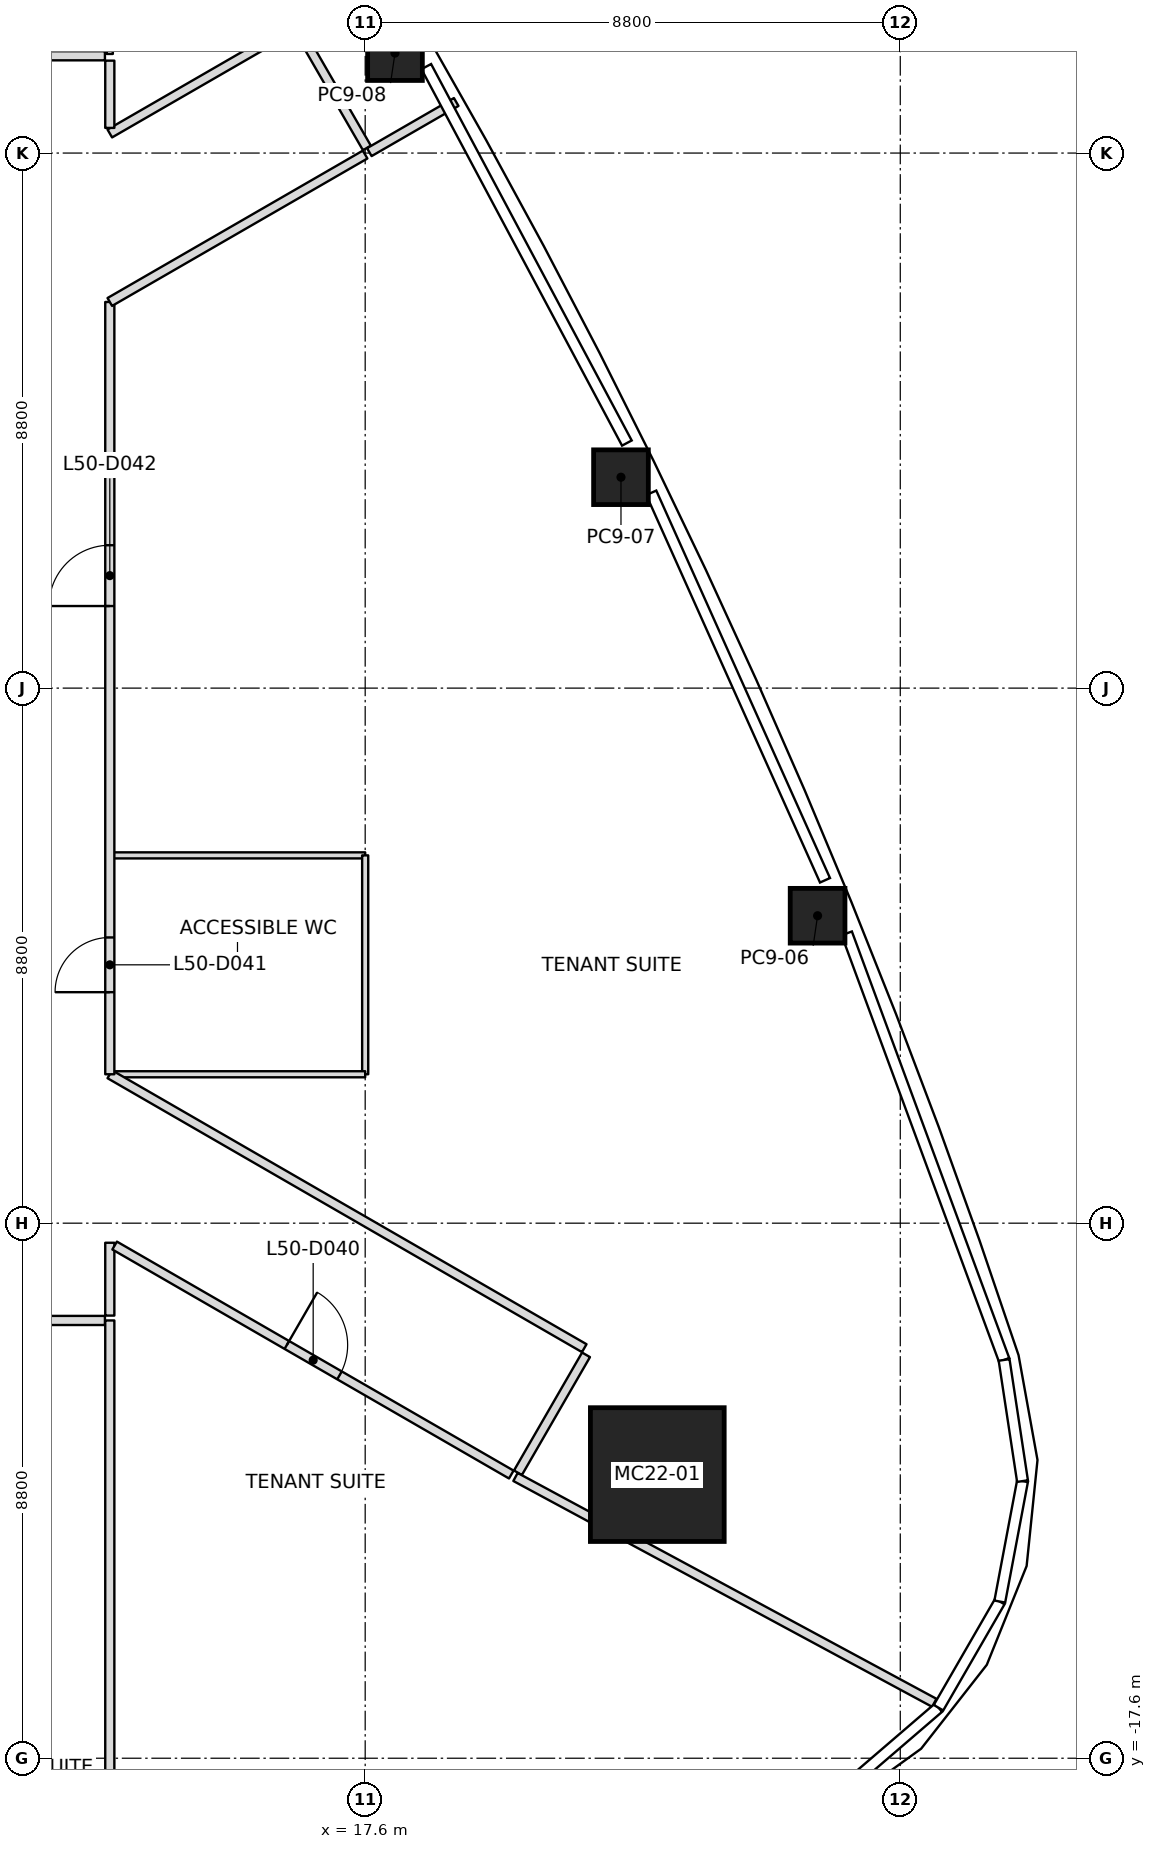
"""IFC4 building model, lengths in metres.
Left out: names, types, materials, properties, quantities, classifications, styles, units other than length and angle.
Written with IfcOpenShell. Run it as: python <this file> out.ifc"""

import sys

from ifc_helpers import new_model, si_unit, direction, frame, frame_2d, origin, origin_2d, place, context, subcontext, project, spatial, rectangle, extrude, clip, halfspace, element, fill, save


model = new_model("IFC4")
c1 = context("Model", 3, precision=1e-05, world=origin(), true_north=direction((0.0, 1.0)))
c2 = subcontext(c1, "Body", "Model", "MODEL_VIEW")
j1 = project(units=[si_unit("LENGTHUNIT", "METRE"), si_unit("PLANEANGLEUNIT", "RADIAN")], contexts=[c1])
p1 = place(None, origin())
s1 = spatial("IfcSite", under=j1, at=p1, CompositionType="ELEMENT")
p2 = place(p1, origin())
s2 = spatial("IfcBuilding", under=s1, at=p2, CompositionType="ELEMENT")
p3 = place(p2, frame((0.0, 0.0, 227.0)))
s3 = spatial("IfcBuildingStorey", under=s2, at=p3, CompositionType="ELEMENT", Elevation=227.0)
p4 = place(p3, frame((22.404, -12.935, 0.0), z_axis=(-0.027878605886, 0.016104927689, 0.999481572936), x_axis=(0.999611316129, 0.000449157512, 0.02787498742)))
e1 = element("IfcColumn", 1, at=p4, inside=s3, PredefinedType="COLUMN", context=c2, shape_type="SweptSolid", body=[
    clip(extrude(rectangle(XDim=2.2, YDim=2.2, at=origin_2d()), origin(), (0.0, 0.0, 1.0), 4.002), halfspace(frame((0.0, 0.0, 0.011)), True)),
])
p5 = place(p3, frame((25.04, -3.744, 0.0), z_axis=(-0.017757540332, 0.01000768596, 0.999792236409), x_axis=(-0.377729507005, 0.925778156217, -0.015975763193)))
e2 = element("IfcColumn", 2, at=p5, inside=s3, PredefinedType="COLUMN", context=c2, shape_type="SweptSolid", body=[
    clip(extrude(rectangle(XDim=0.9, YDim=0.9, at=origin_2d()), origin(), (0.0, 0.0, 1.0), 4.001), halfspace(frame((0.0, 0.0, 0.003)), True)),
])
p6 = place(p3, frame((21.807, 3.469, 0.0), z_axis=(-0.014036674448, 0.002013957638, 0.999899452818), x_axis=(-0.439870752141, 0.898025601958, -0.007983710807)))
e3 = element("IfcColumn", 3, at=p6, inside=s3, PredefinedType="COLUMN", context=c2, shape_type="SweptSolid", body=[
    clip(extrude(rectangle(XDim=0.9, YDim=0.9, at=origin_2d()), origin(), (0.0, 0.0, 1.0), 4.0), halfspace(frame((0.0, 0.0, 0.002)), True)),
])
p7 = place(p3, frame((18.09, 10.444, 0.0), z_axis=(-0.009948074445, -0.005736926367, 0.999934059571), x_axis=(-0.499975258342, 0.8660396879, -5.385525e-06)))
e4 = element("IfcColumn", 4, at=p7, inside=s3, PredefinedType="COLUMN", context=c2, shape_type="SweptSolid", body=[
    clip(extrude(rectangle(XDim=0.9, YDim=0.9, at=origin_2d()), origin(), (0.0, 0.0, 1.0), 4.0), halfspace(frame((0.0, 0.0, 0.001)), True)),
])
p8 = place(p3, frame((13.4, -10.4, 0.0), z_axis=(0.0, 0.0, 1.0), x_axis=(0.0, -1.0, 0.0)))
e5 = element("IfcWall", 5, at=p8, inside=s3, PredefinedType="PARTITIONING", context=c2, shape_type="SweptSolid", body=[
    extrude(rectangle(XDim=10.193, YDim=0.15, at=frame_2d((5.096, 0.0))), origin(), (0.0, 0.0, 1.0), 3.234),
])
p9 = place(p3, frame((19.097, 9.64, 0.0), z_axis=(0.0, 0.0, 1.0), x_axis=(-0.866067297121, -0.499927431592, 0.0)))
e6 = element("IfcWall", 6, at=p9, inside=s3, PredefinedType="PARTITIONING", context=c2, shape_type="SweptSolid", body=[
    extrude(rectangle(XDim=1.65, YDim=0.15, at=frame_2d((0.825, 0.0))), origin(), (0.0, 0.0, 1.0), 3.234),
])
p10 = place(p3, frame((20.072, -12.974, 0.0), z_axis=(0.0, 0.0, 1.0), x_axis=(0.880159358653, -0.474678315678, 0.0)))
e7 = element("IfcWall", 7, at=p10, inside=s3, PredefinedType="PARTITIONING", context=c2, shape_type="SweptSolid", body=[
    extrude(rectangle(XDim=7.825, YDim=0.15, at=frame_2d((3.913, 0.0))), origin(), (0.0, 0.0, 1.0), 3.234),
])
p11 = place(p3, frame((1.2, -10.4, 0.0), z_axis=(0.0, 0.0, 1.0), x_axis=(1.0, 0.0, 0.0)))
e8 = element("IfcWall", 8, at=p11, inside=s3, PredefinedType="PARTITIONING", context=c2, shape_type="SweptSolid", body=[
    extrude(rectangle(XDim=12.12, YDim=0.15, at=frame_2d((6.06, 0.0))), origin(), (0.0, 0.0, 1.0), 3.317),
])
p12 = place(p11, frame((5.6, 0.0, 0.0)))
e9 = element("IfcOpeningElement", 9, at=p12, cuts=e8, PredefinedType="OPENING", context=c2, shape_type="SweptSolid", body=[
    extrude(rectangle(XDim=1.0, YDim=2.1, at=frame_2d((0.5, 1.05))), frame((0.0, 0.075, 0.0), z_axis=(0.0, -1.0, 0.0), x_axis=(1.0, 0.0, 0.0)), (0.0, 0.0, 1.0), 0.15),
])
p13 = place(p3, frame((13.32, 10.4, 0.0), z_axis=(0.0, 0.0, 1.0), x_axis=(-1.0, 0.0, 0.0)))
e10 = element("IfcWall", 10, at=p13, inside=s3, PredefinedType="PARTITIONING", context=c2, shape_type="SweptSolid", body=[
    extrude(rectangle(XDim=5.62, YDim=0.15, at=frame_2d((2.81, 0.0))), origin(), (0.0, 0.0, 1.0), 3.317),
])
p14 = place(p13, frame((1.27, 0.0, 0.0)))
e11 = element("IfcOpeningElement", 11, at=p14, cuts=e10, PredefinedType="OPENING", context=c2, shape_type="SweptSolid", body=[
    extrude(rectangle(XDim=0.9, YDim=2.1, at=frame_2d((0.45, 1.05))), frame((0.0, 0.075, 0.0), z_axis=(0.0, -1.0, 0.0), x_axis=(1.0, 0.0, 0.0)), (0.0, 0.0, 1.0), 0.15),
])
p15 = place(p13, frame((4.12, 0.0, 0.0)))
e12 = element("IfcOpeningElement", 12, at=p15, cuts=e10, PredefinedType="OPENING", context=c2, shape_type="SweptSolid", body=[
    extrude(rectangle(XDim=1.0, YDim=2.1, at=frame_2d((0.5, 1.05))), frame((0.0, 0.075, 0.0), z_axis=(0.0, -1.0, 0.0), x_axis=(1.0, 0.0, 0.0)), (0.0, 0.0, 1.0), 0.15),
])
p16 = place(p3, frame((13.4, -10.32, 0.0), z_axis=(0.0, 0.0, 1.0), x_axis=(0.0, 1.0, 0.0)))
e13 = element("IfcWall", 13, at=p16, inside=s3, PredefinedType="PARTITIONING", context=c2, shape_type="SweptSolid", body=[
    extrude(rectangle(XDim=1.198, YDim=0.15, at=frame_2d((0.599, 0.0))), origin(), (0.0, 0.0, 1.0), 3.233),
])
p17 = place(p3, frame((13.479, -9.168, 0.0), z_axis=(0.0, 0.0, 1.0), x_axis=(0.866036619927, -0.499980572567, 0.0)))
e14 = element("IfcWall", 14, at=p17, inside=s3, PredefinedType="PARTITIONING", context=c2, shape_type="SweptSolid", body=[
    extrude(rectangle(XDim=7.532, YDim=0.15, at=frame_2d((3.766, 0.0))), origin(), (0.0, 0.0, 1.0), 3.233),
])
p18 = place(p17, frame((3.271, 0.0, 0.0)))
e15 = element("IfcOpeningElement", 15, at=p18, cuts=e14, PredefinedType="OPENING", context=c2, shape_type="SweptSolid", body=[
    extrude(rectangle(XDim=1.0, YDim=2.1, at=frame_2d((0.5, 1.05))), frame((0.0, 0.075, 0.0), z_axis=(0.0, -1.0, 0.0), x_axis=(1.0, 0.0, 0.0)), (0.0, 0.0, 1.0), 0.15),
])
p19 = place(p3, frame((16.399, 10.854, 0.0), z_axis=(0.0, 0.0, 1.0), x_axis=(-0.866012988868, -0.50002150265, 0.0)))
e16 = element("IfcWall", 16, at=p19, inside=s3, PredefinedType="PARTITIONING", context=c2, shape_type="SweptSolid", body=[
    extrude(rectangle(XDim=3.463, YDim=0.15, at=frame_2d((1.731, 0.0))), origin(), (0.0, 0.0, 1.0), 3.45),
])
p20 = place(p3, frame((13.4, 9.214, 0.0), z_axis=(0.0, 0.0, 1.0), x_axis=(0.0, 1.0, 0.0)))
e17 = element("IfcWall", 17, at=p20, inside=s3, PredefinedType="PARTITIONING", context=c2, shape_type="SweptSolid", body=[
    extrude(rectangle(XDim=1.106, YDim=0.15, at=frame_2d((0.553, 0.0))), origin(), (0.0, 0.0, 1.0), 3.45),
])
p21 = place(p3, frame((17.628, 8.884, 0.0), z_axis=(0.0, 0.0, 1.0), x_axis=(-0.500030632641, 0.866007717299, 0.0)))
e18 = element("IfcWall", 18, at=p21, inside=s3, PredefinedType="PARTITIONING", context=c2, shape_type="SweptSolid", body=[
    extrude(rectangle(XDim=2.24, YDim=0.15, at=frame_2d((1.12, 0.0))), origin(), (0.0, 0.0, 1.0), 3.45),
])
p22 = place(p3, frame((21.203, -10.856, 0.0), z_axis=(0.0, 0.0, 1.0), x_axis=(-0.866033522472, 0.499985937757, 0.0)))
e19 = element("IfcWall", 19, at=p22, inside=s3, PredefinedType="PARTITIONING", context=c2, shape_type="SweptSolid", body=[
    extrude(rectangle(XDim=9.01, YDim=0.15, at=frame_2d((4.505, 0.0))), origin(), (0.0, 0.0, 1.0), 3.317),
])
p23 = place(p3, frame((13.4, -6.351, 0.0), z_axis=(0.0, 0.0, 1.0), x_axis=(0.0, 1.0, 0.0)))
e20 = element("IfcWall", 20, at=p23, inside=s3, PredefinedType="PARTITIONING", context=c2, shape_type="SweptSolid", body=[
    extrude(rectangle(XDim=12.702, YDim=0.15, at=frame_2d((6.351, 0.0))), origin(), (0.0, 0.0, 1.0), 3.317),
])
p24 = place(p23, frame((1.35, 0.0, 0.0)))
e21 = element("IfcOpeningElement", 21, at=p24, cuts=e20, PredefinedType="OPENING", context=c2, shape_type="SweptSolid", body=[
    extrude(rectangle(XDim=0.9, YDim=2.1, at=frame_2d((0.45, 1.05))), frame((0.0, 0.075, 0.0), z_axis=(0.0, -1.0, 0.0), x_axis=(1.0, 0.0, 0.0)), (0.0, 0.0, 1.0), 0.15),
])
p25 = place(p23, frame((7.701, 0.0, 0.0)))
e22 = element("IfcOpeningElement", 22, at=p25, cuts=e20, PredefinedType="OPENING", context=c2, shape_type="SweptSolid", body=[
    extrude(rectangle(XDim=1.0, YDim=2.1, at=frame_2d((0.5, 1.05))), frame((0.0, 0.075, 0.0), z_axis=(0.0, -1.0, 0.0), x_axis=(1.0, 0.0, 0.0)), (0.0, 0.0, 1.0), 0.15),
])
p26 = place(p3, frame((13.4, 6.351, 0.0), z_axis=(0.0, 0.0, 1.0), x_axis=(0.866022073929, 0.500005767435, 0.0)))
e23 = element("IfcWall", 23, at=p26, inside=s3, PredefinedType="PARTITIONING", context=c2, shape_type="SweptSolid", body=[
    extrude(rectangle(XDim=4.849, YDim=0.15, at=frame_2d((2.424, 0.0))), origin(), (0.0, 0.0, 1.0), 3.45),
])
p27 = place(p3, frame((20.112, -12.905, 0.0), z_axis=(0.0, 0.0, 1.0), x_axis=(0.49994888933, 0.866054910533, 0.0)))
e24 = element("IfcWall", 24, at=p27, inside=s3, PredefinedType="PARTITIONING", context=c2, shape_type="SweptSolid", body=[
    extrude(rectangle(XDim=2.24, YDim=0.15, at=frame_2d((1.12, 0.0))), origin(), (0.0, 0.0, 1.0), 3.233),
])
for number, where, z_axis, x_axis in (
    (25, (13.4, 14.6, 0.0), (0.0, 0.0, 1.0), (0.0, -1.0, 0.0)),
    (26, (13.43, -2.751, 0.0), (0.0, 0.0, 1.0), (1.0, 0.0, 0.0)),
):
    element("IfcWall", number, at=place(p3, frame(where, z_axis=z_axis, x_axis=x_axis)), inside=s3, PredefinedType="PARTITIONING", context=c2, shape_type="SweptSolid", body=[
        extrude(rectangle(XDim=4.17, YDim=0.1, at=frame_2d((2.085, 0.0))), origin(), (0.0, 0.0, 1.0), 3.317),
    ])
p28 = place(p3, frame((17.6, -2.751, 0.0), z_axis=(0.0, 0.0, 1.0), x_axis=(0.0, -1.0, 0.0)))
e27 = element("IfcWall", 27, at=p28, inside=s3, PredefinedType="PARTITIONING", context=c2, shape_type="SweptSolid", body=[
    extrude(rectangle(XDim=3.6, YDim=0.1, at=frame_2d((1.8, 0.0))), origin(), (0.0, 0.0, 1.0), 3.317),
])
p29 = place(p3, frame((17.6, -6.351, 0.0), z_axis=(0.0, 0.0, 1.0), x_axis=(-1.0, 0.0, 0.0)))
e28 = element("IfcWall", 28, at=p29, inside=s3, PredefinedType="PARTITIONING", context=c2, shape_type="SweptSolid", body=[
    extrude(rectangle(XDim=4.14, YDim=0.1, at=frame_2d((2.07, 0.0))), origin(), (0.0, 0.0, 1.0), 3.317),
])
p30 = place(p18, origin())
e29 = element("IfcDoor", 29, at=p30, inside=s3, OperationType="SINGLE_SWING_RIGHT", PredefinedType="DOOR", context=c2, shape_type="SweptSolid", body=[
    extrude(rectangle(XDim=1.0, YDim=2.1, at=frame_2d((0.5, 1.05))), frame((0.0, 0.025, 0.0), z_axis=(0.0, -1.0, 0.0), x_axis=(1.0, 0.0, 0.0)), (0.0, 0.0, 1.0), 0.05),
])
fill(e15, e29)
p31 = place(p24, origin())
e30 = element("IfcDoor", 30, at=p31, inside=s3, OperationType="SINGLE_SWING_RIGHT", PredefinedType="DOOR", context=c2, shape_type="SweptSolid", body=[
    extrude(rectangle(XDim=0.9, YDim=2.1, at=frame_2d((0.45, 1.05))), frame((0.0, 0.025, 0.0), z_axis=(0.0, -1.0, 0.0), x_axis=(1.0, 0.0, 0.0)), (0.0, 0.0, 1.0), 0.05),
])
fill(e21, e30)
p32 = place(p25, origin())
e31 = element("IfcDoor", 31, at=p32, inside=s3, OperationType="SINGLE_SWING_RIGHT", PredefinedType="DOOR", context=c2, shape_type="SweptSolid", body=[
    extrude(rectangle(XDim=1.0, YDim=2.1, at=frame_2d((0.5, 1.05))), frame((0.0, 0.025, 0.0), z_axis=(0.0, -1.0, 0.0), x_axis=(1.0, 0.0, 0.0)), (0.0, 0.0, 1.0), 0.05),
])
fill(e22, e31)
save(model, sys.argv[1])
